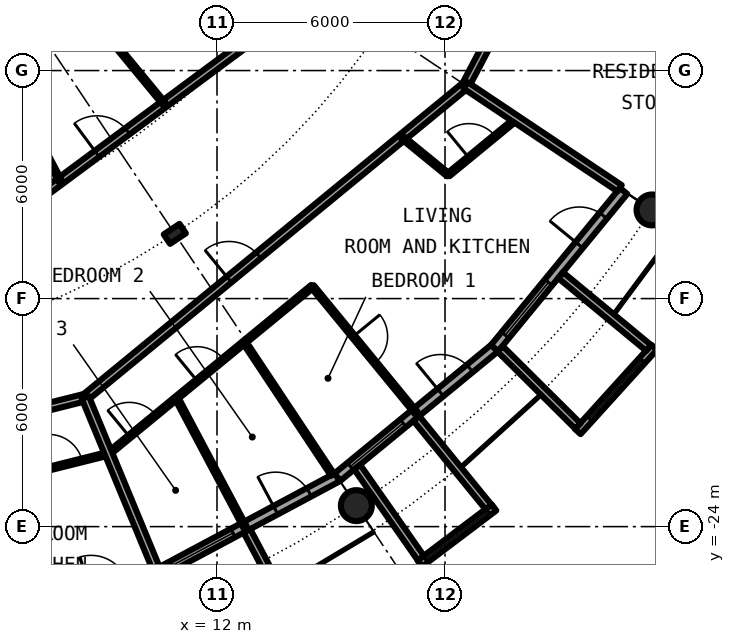
"""IFC4 building model, lengths in metres.
Left out: names, types, materials, properties, quantities, classifications, styles, units other than length and angle.
Written with IfcOpenShell. Run it as: python <this file> out.ifc"""

import sys

from ifc_helpers import new_model, si_unit, direction, frame, frame_2d, origin, origin_2d, place, context, subcontext, project, spatial, rectangle, circle, hollow_circle, i_section, extrude, element, fill, save


model = new_model("IFC4")
c1 = context("Model", 3, precision=1e-05, world=origin(), true_north=direction((0.0, 1.0)))
c2 = subcontext(c1, "Body", "Model", "MODEL_VIEW")
j1 = project(units=[si_unit("LENGTHUNIT", "METRE"), si_unit("PLANEANGLEUNIT", "RADIAN")], contexts=[c1])
p1 = place(None, origin())
s1 = spatial("IfcSite", under=j1, at=p1, CompositionType="ELEMENT")
p2 = place(p1, origin())
s2 = spatial("IfcBuilding", under=s1, at=p2, CompositionType="ELEMENT")
p3 = place(p2, frame((0.0, 0.0, 151.3)))
s3 = spatial("IfcBuildingStorey", under=s2, at=p3, CompositionType="ELEMENT", Elevation=151.3)
for number, where, z_axis, x_axis in (
    (1, (15.667, -23.448, 0.0), (0.0, 0.0, 1.0), (1.0, 0.0, 0.0)),
    (2, (23.448, -15.667, 0.0), (0.0, 0.0, 1.0), (1.0, 0.0, 0.0)),
):
    element("IfcColumn", number, at=place(p3, frame(where, z_axis=z_axis, x_axis=x_axis)), inside=s3, PredefinedType="COLUMN", context=c2, shape_type="SweptSolid", body=[
        extrude(hollow_circle(Radius=0.406, WallThickness=0.04, at=origin_2d()), origin(), (0.0, 0.0, 1.0), 3.05),
    ])
p4 = place(p3, frame((10.889, -16.297, 0.0), z_axis=(0.0, 0.0, 1.0), x_axis=(0.55557023302, -0.831469612303, 0.0)))
e3 = element("IfcColumn", 3, at=p4, inside=s3, PredefinedType="COLUMN", context=c2, shape_type="SweptSolid", body=[
    extrude(i_section(OverallWidth=0.3, OverallDepth=0.5, WebThickness=0.014, FlangeThickness=0.028, FilletRadius=0.027, at=origin_2d()), origin(), (0.0, 0.0, 1.0), 3.05),
])
p5 = place(p3, frame((10.447, -25.222, 0.0), z_axis=(0.0, 0.0, 1.0), x_axis=(0.881915646801, 0.471407246368, 0.0)))
e4 = element("IfcWall", 4, at=p5, inside=s3, PredefinedType="SOLIDWALL", context=c2, shape_type="SweptSolid", body=[
    extrude(rectangle(XDim=5.352, YDim=0.25, at=frame_2d((2.676, 0.0))), origin(), (0.0, 0.0, 1.0), 2.7),
])
p6 = place(p5, frame((0.441, 0.0, 0.3)))
e5 = element("IfcOpeningElement", 5, at=p6, cuts=e4, PredefinedType="OPENING", context=c2, shape_type="SweptSolid", body=[
    extrude(rectangle(XDim=1.8, YDim=2.1, at=frame_2d((0.9, 1.05))), frame((0.0, 0.135, 0.0), z_axis=(0.0, -1.0, 0.0), x_axis=(1.0, 0.0, 0.0)), (0.0, 0.0, 1.0), 0.27),
])
p7 = place(p5, frame((3.51, 0.0, 0.0)))
e6 = element("IfcOpeningElement", 6, at=p7, cuts=e4, PredefinedType="OPENING", context=c2, shape_type="SweptSolid", body=[
    extrude(rectangle(XDim=1.0, YDim=2.2, at=frame_2d((0.5, 1.1))), frame((0.0, 0.135, 0.0), z_axis=(0.0, -1.0, 0.0), x_axis=(1.0, 0.0, 0.0)), (0.0, 0.0, 1.0), 0.27),
])
p8 = place(p3, frame((12.787, -24.113, -0.03), z_axis=(0.0, 0.0, 1.0), x_axis=(0.468365282436, -0.883534924159, 0.0)))
e7 = element("IfcWall", 7, at=p8, inside=s3, PredefinedType="SOLIDWALL", context=c2, shape_type="SweptSolid", body=[
    extrude(rectangle(XDim=3.006, YDim=0.2, at=frame_2d((1.503, 0.0))), origin(), (0.0, 0.0, 1.0), 2.73),
])
p9 = place(p3, frame((15.167, -22.699, 0.0), z_axis=(0.0, 0.0, 1.0), x_axis=(0.773019449054, 0.634382322723, 0.0)))
e8 = element("IfcWall", 8, at=p9, inside=s3, PredefinedType="SOLIDWALL", context=c2, shape_type="SweptSolid", body=[
    extrude(rectangle(XDim=5.352, YDim=0.25, at=frame_2d((2.676, 0.0))), origin(), (0.0, 0.0, 1.0), 2.7),
])
p10 = place(p9, frame((0.441, 0.0, 0.3)))
e9 = element("IfcOpeningElement", 9, at=p10, cuts=e8, PredefinedType="OPENING", context=c2, shape_type="SweptSolid", body=[
    extrude(rectangle(XDim=1.8, YDim=2.1, at=frame_2d((0.9, 1.05))), frame((0.0, 0.135, 0.0), z_axis=(0.0, -1.0, 0.0), x_axis=(1.0, 0.0, 0.0)), (0.0, 0.0, 1.0), 0.27),
])
p11 = place(p9, frame((3.51, 0.0, 0.0)))
e10 = element("IfcOpeningElement", 10, at=p11, cuts=e8, PredefinedType="OPENING", context=c2, shape_type="SweptSolid", body=[
    extrude(rectangle(XDim=1.0, YDim=2.2, at=frame_2d((0.5, 1.1))), frame((0.0, 0.135, 0.0), z_axis=(0.0, -1.0, 0.0), x_axis=(1.0, 0.0, 0.0)), (0.0, 0.0, 1.0), 0.27),
])
p12 = place(p3, frame((17.337, -24.972, -0.03), z_axis=(0.0, 0.0, 1.0), x_axis=(0.797887588059, 0.602806268067, 0.0)))
e11 = element("IfcWall", 11, at=p12, inside=s3, PredefinedType="SOLIDWALL", context=c2, shape_type="SweptSolid", body=[
    extrude(rectangle(XDim=2.447, YDim=0.2, at=frame_2d((1.223, 0.0))), origin(), (0.0, 0.0, 1.0), 2.73),
])
p13 = place(p12, frame((0.183, 0.0, 0.33)))
e12 = element("IfcOpeningElement", 12, at=p13, cuts=e11, PredefinedType="OPENING", context=c2, shape_type="SweptSolid", body=[
    extrude(circle(Radius=1.04, at=frame_2d((1.04, 1.04))), frame((0.0, 0.11, 0.0), z_axis=(0.0, -1.0, 0.0), x_axis=(1.0, 0.0, 0.0)), (0.0, 0.0, 1.0), 0.22),
])
p14 = place(p3, frame((15.688, -22.433, -0.03), z_axis=(0.0, 0.0, 1.0), x_axis=(0.573260687834, -0.819373043115, 0.0)))
e13 = element("IfcWall", 13, at=p14, inside=s3, PredefinedType="SOLIDWALL", context=c2, shape_type="SweptSolid", body=[
    extrude(rectangle(XDim=2.925, YDim=0.2, at=frame_2d((1.463, 0.0))), origin(), (0.0, 0.0, 1.0), 2.73),
])
p15 = place(p3, frame((17.246, -21.155, -0.03), z_axis=(0.0, 0.0, 1.0), x_axis=(0.631741648902, -0.775179004516, 0.0)))
e14 = element("IfcWall", 14, at=p15, inside=s3, PredefinedType="SOLIDWALL", context=c2, shape_type="SweptSolid", body=[
    extrude(rectangle(XDim=3.006, YDim=0.2, at=frame_2d((1.503, 0.0))), origin(), (0.0, 0.0, 1.0), 2.73),
])
p16 = place(p3, frame((19.304, -19.304, 0.0), z_axis=(0.0, 0.0, 1.0), x_axis=(0.634382322723, 0.773019449054, 0.0)))
e15 = element("IfcWall", 15, at=p16, inside=s3, PredefinedType="SOLIDWALL", context=c2, shape_type="SweptSolid", body=[
    extrude(rectangle(XDim=5.352, YDim=0.25, at=frame_2d((2.676, 0.0))), origin(), (0.0, 0.0, 1.0), 2.7),
])
p17 = place(p16, frame((0.441, 0.0, 0.3)))
e16 = element("IfcOpeningElement", 16, at=p17, cuts=e15, PredefinedType="OPENING", context=c2, shape_type="SweptSolid", body=[
    extrude(rectangle(XDim=1.8, YDim=2.1, at=frame_2d((0.9, 1.05))), frame((0.0, 0.135, 0.0), z_axis=(0.0, -1.0, 0.0), x_axis=(1.0, 0.0, 0.0)), (0.0, 0.0, 1.0), 0.27),
])
p18 = place(p16, frame((3.51, 0.0, 0.0)))
e17 = element("IfcOpeningElement", 17, at=p18, cuts=e15, PredefinedType="OPENING", context=c2, shape_type="SweptSolid", body=[
    extrude(rectangle(XDim=1.0, YDim=2.2, at=frame_2d((0.5, 1.1))), frame((0.0, 0.135, 0.0), z_axis=(0.0, -1.0, 0.0), x_axis=(1.0, 0.0, 0.0)), (0.0, 0.0, 1.0), 0.27),
])
p19 = place(p3, frame((21.493, -21.5, -0.03), z_axis=(0.0, 0.0, 1.0), x_axis=(0.671506829416, 0.740998365753, 0.0)))
e18 = element("IfcWall", 18, at=p19, inside=s3, PredefinedType="SOLIDWALL", context=c2, shape_type="SweptSolid", body=[
    extrude(rectangle(XDim=2.993, YDim=0.2, at=frame_2d((1.497, 0.0))), origin(), (0.0, 0.0, 1.0), 2.73),
])
p20 = place(p19, frame((0.457, 0.0, 0.33)))
e19 = element("IfcOpeningElement", 19, at=p20, cuts=e18, PredefinedType="OPENING", context=c2, shape_type="SweptSolid", body=[
    extrude(circle(Radius=1.04, at=frame_2d((1.04, 1.04))), frame((0.0, 0.11, 0.0), z_axis=(0.0, -1.0, 0.0), x_axis=(1.0, 0.0, 0.0)), (0.0, 0.0, 1.0), 0.22),
])
p21 = place(p3, frame((19.45, -19.323, -0.03), z_axis=(0.0, 0.0, 1.0), x_axis=(0.709727076896, -0.704476739375, 0.0)))
e20 = element("IfcWall", 20, at=p21, inside=s3, PredefinedType="SOLIDWALL", context=c2, shape_type="SweptSolid", body=[
    extrude(rectangle(XDim=2.883, YDim=0.2, at=frame_2d((1.441, 0.0))), origin(), (0.0, 0.0, 1.0), 2.73),
])
p22 = place(p3, frame((21.041, -17.384, -0.03), z_axis=(0.0, 0.0, 1.0), x_axis=(0.770784861449, -0.63709551667, 0.0)))
e21 = element("IfcWall", 21, at=p22, inside=s3, PredefinedType="SOLIDWALL", context=c2, shape_type="SweptSolid", body=[
    extrude(rectangle(XDim=3.006, YDim=0.2, at=frame_2d((1.503, 0.0))), origin(), (0.0, 0.0, 1.0), 2.73),
])
p23 = place(p3, frame((6.878, -22.649, 0.0), z_axis=(0.0, 0.0, 1.0), x_axis=(0.9700564467, 0.242879579658, 0.0)))
e22 = element("IfcWall", 22, at=p23, inside=s3, PredefinedType="PARTITIONING", context=c2, shape_type="SweptSolid", body=[
    extrude(rectangle(XDim=2.338, YDim=0.1, at=frame_2d((1.169, 0.0))), origin(), (0.0, 0.0, 1.0), 2.7),
])
p24 = place(p23, frame((0.719, 0.0, 0.0)))
e23 = element("IfcOpeningElement", 23, at=p24, cuts=e22, PredefinedType="OPENING", context=c2, shape_type="SweptSolid", body=[
    extrude(rectangle(XDim=0.9, YDim=2.3, at=frame_2d((0.45, 1.15))), frame((0.0, 0.06, 0.0), z_axis=(0.0, -1.0, 0.0), x_axis=(1.0, 0.0, 0.0)), (0.0, 0.0, 1.0), 0.12),
])
p25 = place(p3, frame((9.146, -22.081, 0.0), z_axis=(0.0, 0.0, 1.0), x_axis=(0.772956112865, 0.634459492469, 0.0)))
e24 = element("IfcWall", 24, at=p25, inside=s3, PredefinedType="PARTITIONING", context=c2, shape_type="SweptSolid", body=[
    extrude(rectangle(XDim=6.938, YDim=0.1, at=frame_2d((3.469, 0.0))), origin(), (0.0, 0.0, 1.0), 2.7),
])
p26 = place(p25, frame((3.018, 0.0, 0.0)))
e25 = element("IfcOpeningElement", 25, at=p26, cuts=e24, PredefinedType="OPENING", context=c2, shape_type="SweptSolid", body=[
    extrude(rectangle(XDim=0.9, YDim=2.3, at=frame_2d((0.45, 1.15))), frame((0.0, 0.06, 0.0), z_axis=(0.0, -1.0, 0.0), x_axis=(1.0, 0.0, 0.0)), (0.0, 0.0, 1.0), 0.12),
])
p27 = place(p25, frame((0.709, 0.0, 0.0)))
e26 = element("IfcOpeningElement", 26, at=p27, cuts=e24, PredefinedType="OPENING", context=c2, shape_type="SweptSolid", body=[
    extrude(rectangle(XDim=0.9, YDim=2.3, at=frame_2d((0.45, 1.15))), frame((0.0, 0.06, 0.0), z_axis=(0.0, -1.0, 0.0), x_axis=(1.0, 0.0, 0.0)), (0.0, 0.0, 1.0), 0.12),
])
p28 = place(p3, frame((18.087, -14.742, 0.0), z_axis=(0.0, 0.0, 1.0), x_axis=(0.77288890179, 0.634541366256, 0.0)))
e27 = element("IfcWall", 27, at=p28, inside=s3, PredefinedType="PARTITIONING", context=c2, shape_type="SweptSolid", body=[
    extrude(rectangle(XDim=2.313, YDim=0.1, at=frame_2d((1.157, 0.0))), origin(), (0.0, 0.0, 1.0), 2.7),
])
p29 = place(p28, frame((0.702, 0.0, 0.0)))
e28 = element("IfcOpeningElement", 28, at=p29, cuts=e27, PredefinedType="OPENING", context=c2, shape_type="SweptSolid", body=[
    extrude(rectangle(XDim=0.9, YDim=2.3, at=frame_2d((0.45, 1.15))), frame((0.0, 0.06, 0.0), z_axis=(0.0, -1.0, 0.0), x_axis=(1.0, 0.0, 0.0)), (0.0, 0.0, 1.0), 0.12),
])
p30 = place(p3, frame((18.542, -12.389, 0.0), z_axis=(0.0, 0.0, 1.0), x_axis=(0.465605550524, 0.884992356646, 0.0)))
e29 = element("IfcWall", 29, at=p30, inside=s3, PredefinedType="PARTITIONING", context=c2, shape_type="SweptSolid", body=[
    extrude(rectangle(XDim=1.643, YDim=0.2, at=frame_2d((0.821, 0.0))), origin(), (0.0, 0.0, 1.0), 2.7),
])
p31 = place(p3, frame((2.186, -22.193, 0.0), z_axis=(0.0, 0.0, 1.0), x_axis=(0.97003047456, 0.242983288366, 0.0)))
e30 = element("IfcWall", 30, at=p31, inside=s3, PredefinedType="PARTITIONING", context=c2, shape_type="SweptSolid", body=[
    extrude(rectangle(XDim=6.544, YDim=0.2, at=frame_2d((3.272, 0.0))), origin(), (0.0, 0.0, 1.0), 2.7),
])
p32 = place(p31, frame((1.681, 0.0, 0.0)))
e31 = element("IfcOpeningElement", 31, at=p32, cuts=e30, PredefinedType="OPENING", context=c2, shape_type="SweptSolid", body=[
    extrude(rectangle(XDim=1.0, YDim=2.3, at=frame_2d((0.5, 1.15))), frame((0.0, 0.11, 0.0), z_axis=(0.0, -1.0, 0.0), x_axis=(1.0, 0.0, 0.0)), (0.0, 0.0, 1.0), 0.22),
])
p33 = place(p3, frame((8.534, -20.603, 0.0), z_axis=(0.0, 0.0, 1.0), x_axis=(0.772983503654, 0.634426121056, 0.0)))
e32 = element("IfcWall", 32, at=p33, inside=s3, PredefinedType="PARTITIONING", context=c2, shape_type="SweptSolid", body=[
    extrude(rectangle(XDim=12.947, YDim=0.2, at=frame_2d((6.474, 0.0))), origin(), (0.0, 0.0, 1.0), 2.7),
])
p34 = place(p33, frame((4.895, 0.0, 0.0)))
e33 = element("IfcOpeningElement", 33, at=p34, cuts=e32, PredefinedType="OPENING", context=c2, shape_type="SweptSolid", body=[
    extrude(rectangle(XDim=1.0, YDim=2.3, at=frame_2d((0.5, 1.15))), frame((0.0, 0.11, 0.0), z_axis=(0.0, -1.0, 0.0), x_axis=(1.0, 0.0, 0.0)), (0.0, 0.0, 1.0), 0.22),
])
p35 = place(p3, frame((5.137, -16.938, 0.0), z_axis=(0.0, 0.0, 1.0), x_axis=(0.803229232922, 0.595670042371, 0.0)))
e34 = element("IfcWall", 34, at=p35, inside=s3, PredefinedType="PARTITIONING", context=c2, shape_type="SweptSolid", body=[
    extrude(rectangle(XDim=10.224, YDim=0.2, at=frame_2d((5.112, 0.0))), origin(), (0.0, 0.0, 1.0), 2.7),
])
p36 = place(p35, frame((4.612, 0.0, 0.0)))
e35 = element("IfcOpeningElement", 35, at=p36, cuts=e34, PredefinedType="OPENING", context=c2, shape_type="SweptSolid", body=[
    extrude(rectangle(XDim=1.0, YDim=2.3, at=frame_2d((0.5, 1.15))), frame((0.0, 0.11, 0.0), z_axis=(0.0, -1.0, 0.0), x_axis=(1.0, 0.0, 0.0)), (0.0, 0.0, 1.0), 0.22),
])
p37 = place(p3, frame((12.721, -19.147, 0.0), z_axis=(0.0, 0.0, 1.0), x_axis=(0.553609857728, -0.832776155654, 0.0)))
e36 = element("IfcWall", 36, at=p37, inside=s3, PredefinedType="PARTITIONING", context=c2, shape_type="SweptSolid", body=[
    extrude(rectangle(XDim=4.187, YDim=0.1, at=frame_2d((2.094, 0.0))), origin(), (0.0, 0.0, 1.0), 2.7),
])
p38 = place(p3, frame((4.908, -5.959, 0.0), z_axis=(0.0, 0.0, 1.0), x_axis=(0.636115614725, -0.771593756262, 0.0)))
e37 = element("IfcWall", 37, at=p38, inside=s3, PredefinedType="PARTITIONING", context=c2, shape_type="SweptSolid", body=[
    extrude(rectangle(XDim=8.967, YDim=0.1, at=frame_2d((4.483, 0.0))), origin(), (0.0, 0.0, 1.0), 2.7),
])
p39 = place(p38, frame((6.4, 0.0, 0.0)))
e38 = element("IfcOpeningElement", 38, at=p39, cuts=e37, PredefinedType="OPENING", context=c2, shape_type="SweptSolid", body=[
    extrude(rectangle(XDim=0.9, YDim=2.3, at=frame_2d((0.45, 1.15))), frame((0.0, 0.06, 0.0), z_axis=(0.0, -1.0, 0.0), x_axis=(1.0, 0.0, 0.0)), (0.0, 0.0, 1.0), 0.12),
])
p40 = place(p38, frame((1.917, 0.0, 0.0)))
e39 = element("IfcOpeningElement", 39, at=p40, cuts=e37, PredefinedType="OPENING", context=c2, shape_type="SweptSolid", body=[
    extrude(rectangle(XDim=0.9, YDim=2.3, at=frame_2d((0.45, 1.15))), frame((0.0, 0.06, 0.0), z_axis=(0.0, -1.0, 0.0), x_axis=(1.0, 0.0, 0.0)), (0.0, 0.0, 1.0), 0.12),
])
p41 = place(p3, frame((5.875, -11.126, 0.0), z_axis=(0.0, 0.0, 1.0), x_axis=(0.467030118529, -0.884241408432, 0.0)))
e40 = element("IfcWall", 40, at=p41, inside=s3, PredefinedType="PARTITIONING", context=c2, shape_type="SweptSolid", body=[
    extrude(rectangle(XDim=4.278, YDim=0.1, at=frame_2d((2.139, 0.0))), origin(), (0.0, 0.0, 1.0), 2.7),
])
p42 = place(p41, frame((1.689, 0.0, 0.0)))
e41 = element("IfcOpeningElement", 41, at=p42, cuts=e40, PredefinedType="OPENING", context=c2, shape_type="SweptSolid", body=[
    extrude(rectangle(XDim=0.9, YDim=2.3, at=frame_2d((0.45, 1.15))), frame((0.0, 0.06, 0.0), z_axis=(0.0, -1.0, 0.0), x_axis=(1.0, 0.0, 0.0)), (0.0, 0.0, 1.0), 0.12),
])
p43 = place(p3, frame((8.534, -20.603, 0.0), z_axis=(0.0, 0.0, 1.0), x_axis=(0.382651153718, -0.923892902104, 0.0)))
e42 = element("IfcWall", 42, at=p43, inside=s3, PredefinedType="PARTITIONING", context=c2, shape_type="SweptSolid", body=[
    extrude(rectangle(XDim=4.874, YDim=0.2, at=frame_2d((2.437, 0.0))), origin(), (0.0, 0.0, 1.0), 2.7),
])
p44 = place(p3, frame((10.934, -20.614, 0.0), z_axis=(0.0, 0.0, 1.0), x_axis=(0.468594334564, -0.883413464701, 0.0)))
e43 = element("IfcWall", 43, at=p44, inside=s3, PredefinedType="PARTITIONING", context=c2, shape_type="SweptSolid", body=[
    extrude(rectangle(XDim=3.841, YDim=0.1, at=frame_2d((1.92, 0.0))), origin(), (0.0, 0.0, 1.0), 2.7),
])
p45 = place(p3, frame((14.509, -17.679, 0.0), z_axis=(0.0, 0.0, 1.0), x_axis=(0.634342681687, -0.77305197897, 0.0)))
e44 = element("IfcWall", 44, at=p45, inside=s3, PredefinedType="PARTITIONING", context=c2, shape_type="SweptSolid", body=[
    extrude(rectangle(XDim=4.305, YDim=0.1, at=frame_2d((2.153, 0.0))), origin(), (0.0, 0.0, 1.0), 2.7),
])
p46 = place(p45, frame((1.703, 0.0, 0.0)))
e45 = element("IfcOpeningElement", 45, at=p46, cuts=e44, PredefinedType="OPENING", context=c2, shape_type="SweptSolid", body=[
    extrude(rectangle(XDim=0.9, YDim=2.3, at=frame_2d((0.45, 1.15))), frame((0.0, 0.06, 0.0), z_axis=(0.0, -1.0, 0.0), x_axis=(1.0, 0.0, 0.0)), (0.0, 0.0, 1.0), 0.12),
])
p47 = place(p3, frame((16.874, -13.758, 0.0), z_axis=(0.0, 0.0, 1.0), x_axis=(0.774869051393, -0.632121786679, 0.0)))
e46 = element("IfcWall", 46, at=p47, inside=s3, PredefinedType="PARTITIONING", context=c2, shape_type="SweptSolid", body=[
    extrude(rectangle(XDim=1.562, YDim=0.1, at=frame_2d((0.781, 0.0))), origin(), (0.0, 0.0, 1.0), 2.7),
])
p48 = place(p3, frame((18.542, -12.389, 0.0), z_axis=(0.0, 0.0, 1.0), x_axis=(0.831387096605, -0.55569370664, 0.0)))
e47 = element("IfcWall", 47, at=p48, inside=s3, PredefinedType="PARTITIONING", context=c2, shape_type="SweptSolid", body=[
    extrude(rectangle(XDim=4.875, YDim=0.2, at=frame_2d((2.438, 0.0))), origin(), (0.0, 0.0, 1.0), 2.7),
])
p49 = place(p6, origin())
e48 = element("IfcWindow", 48, at=p49, inside=s3, PartitioningType="SINGLE_PANEL", PredefinedType="WINDOW", context=c2, shape_type="SweptSolid", body=[
    extrude(rectangle(XDim=1.8, YDim=2.1, at=frame_2d((0.9, 1.05))), frame((0.0, 0.03, 0.0), z_axis=(0.0, -1.0, 0.0), x_axis=(1.0, 0.0, 0.0)), (0.0, 0.0, 1.0), 0.06),
])
fill(e5, e48)
p50 = place(p7, origin())
e49 = element("IfcDoor", 49, at=p50, inside=s3, OperationType="SINGLE_SWING_LEFT", PredefinedType="DOOR", context=c2, shape_type="SweptSolid", body=[
    extrude(rectangle(XDim=1.0, YDim=2.2, at=frame_2d((0.5, 1.1))), frame((0.0, 0.025, 0.0), z_axis=(0.0, -1.0, 0.0), x_axis=(1.0, 0.0, 0.0)), (0.0, 0.0, 1.0), 0.05),
])
fill(e6, e49)
p51 = place(p10, origin())
e50 = element("IfcWindow", 50, at=p51, inside=s3, PartitioningType="SINGLE_PANEL", PredefinedType="WINDOW", context=c2, shape_type="SweptSolid", body=[
    extrude(rectangle(XDim=1.8, YDim=2.1, at=frame_2d((0.9, 1.05))), frame((0.0, 0.03, 0.0), z_axis=(0.0, -1.0, 0.0), x_axis=(1.0, 0.0, 0.0)), (0.0, 0.0, 1.0), 0.06),
])
fill(e9, e50)
p52 = place(p13, origin())
e51 = element("IfcWindow", 51, at=p52, inside=s3, PartitioningType="SINGLE_PANEL", PredefinedType="WINDOW", context=c2, shape_type="SweptSolid", body=[
    extrude(circle(Radius=1.04, at=frame_2d((1.04, 1.04))), frame((0.0, 0.03, 0.0), z_axis=(0.0, -1.0, 0.0), x_axis=(1.0, 0.0, 0.0)), (0.0, 0.0, 1.0), 0.06),
])
fill(e12, e51)
p53 = place(p11, origin())
e52 = element("IfcDoor", 52, at=p53, inside=s3, OperationType="SINGLE_SWING_LEFT", PredefinedType="DOOR", context=c2, shape_type="SweptSolid", body=[
    extrude(rectangle(XDim=1.0, YDim=2.2, at=frame_2d((0.5, 1.1))), frame((0.0, 0.025, 0.0), z_axis=(0.0, -1.0, 0.0), x_axis=(1.0, 0.0, 0.0)), (0.0, 0.0, 1.0), 0.05),
])
fill(e10, e52)
p54 = place(p17, origin())
e53 = element("IfcWindow", 53, at=p54, inside=s3, PartitioningType="SINGLE_PANEL", PredefinedType="WINDOW", context=c2, shape_type="SweptSolid", body=[
    extrude(rectangle(XDim=1.8, YDim=2.1, at=frame_2d((0.9, 1.05))), frame((0.0, 0.03, 0.0), z_axis=(0.0, -1.0, 0.0), x_axis=(1.0, 0.0, 0.0)), (0.0, 0.0, 1.0), 0.06),
])
fill(e16, e53)
p55 = place(p20, origin())
e54 = element("IfcWindow", 54, at=p55, inside=s3, PartitioningType="SINGLE_PANEL", PredefinedType="WINDOW", context=c2, shape_type="SweptSolid", body=[
    extrude(circle(Radius=1.04, at=frame_2d((1.04, 1.04))), frame((0.0, 0.03, 0.0), z_axis=(0.0, -1.0, 0.0), x_axis=(1.0, 0.0, 0.0)), (0.0, 0.0, 1.0), 0.06),
])
fill(e19, e54)
p56 = place(p18, origin())
e55 = element("IfcDoor", 55, at=p56, inside=s3, OperationType="SINGLE_SWING_LEFT", PredefinedType="DOOR", context=c2, shape_type="SweptSolid", body=[
    extrude(rectangle(XDim=1.0, YDim=2.2, at=frame_2d((0.5, 1.1))), frame((0.0, 0.025, 0.0), z_axis=(0.0, -1.0, 0.0), x_axis=(1.0, 0.0, 0.0)), (0.0, 0.0, 1.0), 0.05),
])
fill(e17, e55)
p57 = place(p24, origin())
e56 = element("IfcDoor", 56, at=p57, inside=s3, OperationType="SINGLE_SWING_LEFT", PredefinedType="DOOR", context=c2, shape_type="SweptSolid", body=[
    extrude(rectangle(XDim=0.9, YDim=2.3, at=frame_2d((0.45, 1.15))), frame((0.0, 0.025, 0.0), z_axis=(0.0, -1.0, 0.0), x_axis=(1.0, 0.0, 0.0)), (0.0, 0.0, 1.0), 0.05),
])
fill(e23, e56)
p58 = place(p34, origin())
e57 = element("IfcDoor", 57, at=p58, inside=s3, OperationType="SINGLE_SWING_LEFT", PredefinedType="DOOR", context=c2, shape_type="SweptSolid", body=[
    extrude(rectangle(XDim=1.0, YDim=2.3, at=frame_2d((0.5, 1.15))), frame((0.0, 0.025, 0.0), z_axis=(0.0, -1.0, 0.0), x_axis=(1.0, 0.0, 0.0)), (0.0, 0.0, 1.0), 0.05),
])
fill(e33, e57)
p59 = place(p29, origin())
e58 = element("IfcDoor", 58, at=p59, inside=s3, OperationType="SINGLE_SWING_LEFT", PredefinedType="DOOR", context=c2, shape_type="SweptSolid", body=[
    extrude(rectangle(XDim=0.9, YDim=2.3, at=frame_2d((0.45, 1.15))), frame((0.0, 0.025, 0.0), z_axis=(0.0, -1.0, 0.0), x_axis=(1.0, 0.0, 0.0)), (0.0, 0.0, 1.0), 0.05),
])
fill(e28, e58)
p60 = place(p46, origin())
e59 = element("IfcDoor", 59, at=p60, inside=s3, OperationType="SINGLE_SWING_RIGHT", PredefinedType="DOOR", context=c2, shape_type="SweptSolid", body=[
    extrude(rectangle(XDim=0.9, YDim=2.3, at=frame_2d((0.45, 1.15))), frame((0.0, 0.025, 0.0), z_axis=(0.0, -1.0, 0.0), x_axis=(1.0, 0.0, 0.0)), (0.0, 0.0, 1.0), 0.05),
])
fill(e45, e59)
p61 = place(p26, origin())
e60 = element("IfcDoor", 60, at=p61, inside=s3, OperationType="SINGLE_SWING_LEFT", PredefinedType="DOOR", context=c2, shape_type="SweptSolid", body=[
    extrude(rectangle(XDim=0.9, YDim=2.3, at=frame_2d((0.45, 1.15))), frame((0.0, 0.025, 0.0), z_axis=(0.0, -1.0, 0.0), x_axis=(1.0, 0.0, 0.0)), (0.0, 0.0, 1.0), 0.05),
])
fill(e25, e60)
p62 = place(p27, origin())
e61 = element("IfcDoor", 61, at=p62, inside=s3, OperationType="SINGLE_SWING_LEFT", PredefinedType="DOOR", context=c2, shape_type="SweptSolid", body=[
    extrude(rectangle(XDim=0.9, YDim=2.3, at=frame_2d((0.45, 1.15))), frame((0.0, 0.025, 0.0), z_axis=(0.0, -1.0, 0.0), x_axis=(1.0, 0.0, 0.0)), (0.0, 0.0, 1.0), 0.05),
])
fill(e26, e61)
p63 = place(p36, origin())
e62 = element("IfcDoor", 62, at=p63, inside=s3, OperationType="SINGLE_SWING_RIGHT", PredefinedType="DOOR", context=c2, shape_type="SweptSolid", body=[
    extrude(rectangle(XDim=1.0, YDim=2.3, at=frame_2d((0.5, 1.15))), frame((0.0, 0.025, 0.0), z_axis=(0.0, -1.0, 0.0), x_axis=(1.0, 0.0, 0.0)), (0.0, 0.0, 1.0), 0.05),
])
fill(e35, e62)
p64 = place(p39, origin())
e63 = element("IfcDoor", 63, at=p64, inside=s3, OperationType="SINGLE_SWING_RIGHT", PredefinedType="DOOR", context=c2, shape_type="SweptSolid", body=[
    extrude(rectangle(XDim=0.9, YDim=2.3, at=frame_2d((0.45, 1.15))), frame((0.0, 0.025, 0.0), z_axis=(0.0, -1.0, 0.0), x_axis=(1.0, 0.0, 0.0)), (0.0, 0.0, 1.0), 0.05),
])
fill(e38, e63)
save(model, sys.argv[1])
